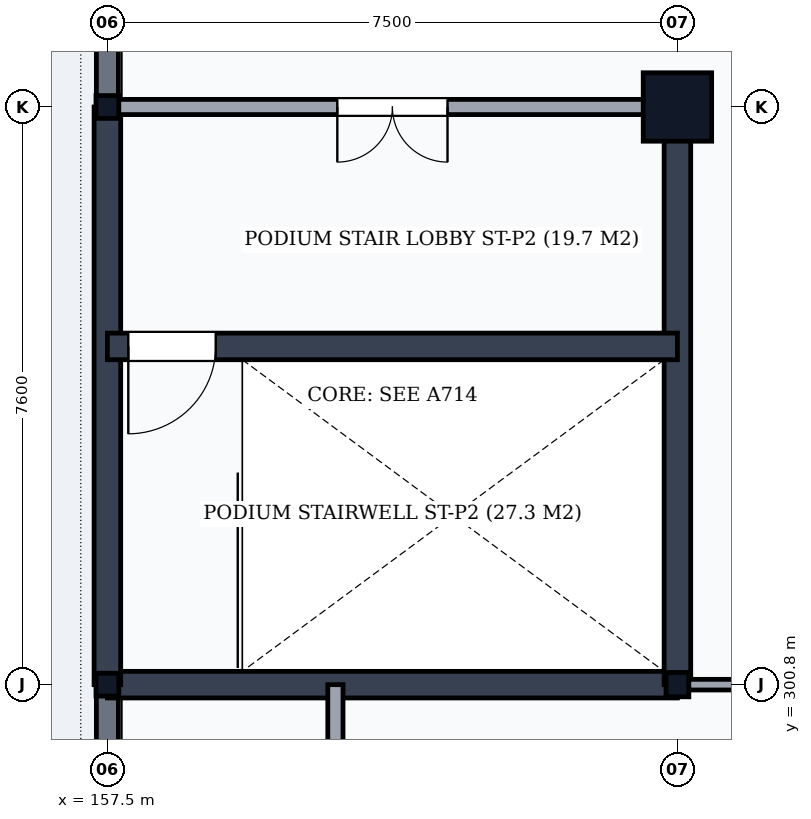
"""IFC4 building model, lengths in metres.
Left out: names, types, materials, properties, quantities, classifications, styles, units other than length and angle.
Written with IfcOpenShell. Run it as: python <this file> out.ifc"""

import sys

from ifc_helpers import new_model, si_unit, direction, frame, frame_2d, origin, origin_2d, place, context, subcontext, project, spatial, rectangle, circle, i_section, extrude, element, fill, save


model = new_model("IFC4")
c1 = context("Model", 3, precision=1e-05, world=origin(), true_north=direction((0.0, 1.0)))
c2 = subcontext(c1, "Body", "Model", "MODEL_VIEW")
j1 = project(units=[si_unit("LENGTHUNIT", "METRE"), si_unit("PLANEANGLEUNIT", "RADIAN")], contexts=[c1])
p1 = place(None, origin())
s1 = spatial("IfcSite", under=j1, at=p1, CompositionType="ELEMENT")
p2 = place(p1, origin())
s2 = spatial("IfcBuilding", under=s1, at=p2, CompositionType="ELEMENT")
p3 = place(p2, frame((0.0, 0.0, 15.6)))
s3 = spatial("IfcBuildingStorey", under=s2, at=p3, CompositionType="ELEMENT", Elevation=15.6)
for number, where, z_axis, x_axis in (
    (1, (157.5, 300.8, 0.0), (0.0, 0.0, 1.0), (1.0, 0.0, 0.0)),
    (2, (157.5, 308.4, 0.0), (0.0, 0.0, 1.0), (1.0, 0.0, 0.0)),
):
    element("IfcColumn", number, at=place(p3, frame(where, z_axis=z_axis, x_axis=x_axis)), inside=s3, PredefinedType="COLUMN", context=c2, shape_type="SweptSolid", body=[
        extrude(i_section(OverallWidth=0.3, OverallDepth=0.3, WebThickness=0.011, FlangeThickness=0.019, FilletRadius=0.027, at=origin_2d()), origin(), (0.0, 0.0, 1.0), 4.8),
    ])
p4 = place(p3, frame((165.0, 300.8, 0.0), z_axis=(0.0, 0.0, 1.0), x_axis=(1.0, 0.0, 0.0)))
e3 = element("IfcColumn", 3, at=p4, inside=s3, PredefinedType="COLUMN", context=c2, shape_type="SweptSolid", body=[
    extrude(i_section(OverallWidth=0.3, OverallDepth=0.32, WebThickness=0.011, FlangeThickness=0.021, FilletRadius=0.027, at=origin_2d()), origin(), (0.0, 0.0, 1.0), 4.8),
])
p5 = place(p3, frame((165.0, 308.4, 0.0), z_axis=(0.0, 0.0, 1.0), x_axis=(1.0, 0.0, 0.0)))
e4 = element("IfcColumn", 4, at=p5, inside=s3, PredefinedType="COLUMN", context=c2, shape_type="SweptSolid", body=[
    extrude(circle(Radius=0.45, at=origin_2d()), origin(), (0.0, 0.0, 1.0), 4.8),
])
p6 = place(p3, frame((157.5, 293.206, 0.0), z_axis=(0.0, 0.0, 1.0), x_axis=(0.0, 1.0, 0.0)))
e5 = element("IfcWall", 5, at=p6, inside=s3, PredefinedType="SOLIDWALL", context=c2, shape_type="SweptSolid", body=[
    extrude(rectangle(XDim=7.588, YDim=0.29, at=frame_2d((3.794, 0.0))), origin(), (0.0, 0.0, 1.0), 4.278),
])
p7 = place(p6, frame((2.694, 0.0, 0.95)))
e6 = element("IfcOpeningElement", 6, at=p7, cuts=e5, PredefinedType="OPENING", context=c2, shape_type="SweptSolid", body=[
    extrude(rectangle(XDim=2.2, YDim=2.8, at=frame_2d((1.1, 1.4))), frame((0.0, 0.16, 0.0), z_axis=(0.0, -1.0, 0.0), x_axis=(1.0, 0.0, 0.0)), (0.0, 0.0, 1.0), 0.32),
])
p8 = place(p3, frame((157.5, 308.406, 0.0), z_axis=(0.0, 0.0, 1.0), x_axis=(0.0, 1.0, 0.0)))
e7 = element("IfcWall", 7, at=p8, inside=s3, PredefinedType="SOLIDWALL", context=c2, shape_type="SweptSolid", body=[
    extrude(rectangle(XDim=7.588, YDim=0.29, at=frame_2d((3.794, 0.0))), origin(), (0.0, 0.0, 1.0), 4.278),
])
p9 = place(p8, frame((2.894, 0.0, 0.95)))
e8 = element("IfcOpeningElement", 8, at=p9, cuts=e7, PredefinedType="OPENING", context=c2, shape_type="SweptSolid", body=[
    extrude(rectangle(XDim=1.8, YDim=2.6, at=frame_2d((0.9, 1.3))), frame((0.0, 0.16, 0.0), z_axis=(0.0, -1.0, 0.0), x_axis=(1.0, 0.0, 0.0)), (0.0, 0.0, 1.0), 0.32),
])
p10 = place(p3, frame((157.6, 248.6, 4.8), z_axis=(0.0, 0.0, 1.0), x_axis=(0.0, 1.0, 0.0)))
e9 = element("IfcWall", 9, at=p10, inside=s3, PredefinedType="PARAPET", context=c2, shape_type="SweptSolid", body=[
    extrude(rectangle(XDim=67.2, YDim=0.18, at=frame_2d((33.6, 0.0))), origin(), (0.0, 0.0, 1.0), 1.2),
])
p11 = place(p3, frame((157.5, 300.8, 0.0), z_axis=(0.0, 0.0, 1.0), x_axis=(1.0, 0.0, 0.0)))
e10 = element("IfcWall", 10, at=p11, inside=s3, PredefinedType="SHEAR", context=c2, shape_type="SweptSolid", body=[
    extrude(rectangle(XDim=7.5, YDim=0.35, at=frame_2d((3.75, 0.0))), origin(), (0.0, 0.0, 1.0), 4.48),
])
for number, where, z_axis, x_axis in (
    (11, (157.5, 300.8, 0.0), (0.0, 0.0, 1.0), (0.0, 1.0, 0.0)),
    (12, (165.0, 300.8, 0.0), (0.0, 0.0, 1.0), (0.0, 1.0, 0.0)),
):
    element("IfcWall", number, at=place(p3, frame(where, z_axis=z_axis, x_axis=x_axis)), inside=s3, PredefinedType="SHEAR", context=c2, shape_type="SweptSolid", body=[
        extrude(rectangle(XDim=7.6, YDim=0.35, at=frame_2d((3.8, 0.0))), origin(), (0.0, 0.0, 1.0), 4.48),
    ])
p12 = place(p3, frame((157.5, 305.25, 0.0), z_axis=(0.0, 0.0, 1.0), x_axis=(1.0, 0.0, 0.0)))
e13 = element("IfcWall", 13, at=p12, inside=s3, PredefinedType="SHEAR", context=c2, shape_type="SweptSolid", body=[
    extrude(rectangle(XDim=7.5, YDim=0.35, at=frame_2d((3.75, 0.0))), origin(), (0.0, 0.0, 1.0), 4.48),
])
p13 = place(p12, frame((0.275, 0.0, 0.0)))
e14 = element("IfcOpeningElement", 14, at=p13, cuts=e13, PredefinedType="OPENING", context=c2, shape_type="SweptSolid", body=[
    extrude(rectangle(XDim=1.15, YDim=2.15, at=frame_2d((0.575, 1.075))), frame((0.0, 0.19, 0.0), z_axis=(0.0, -1.0, 0.0), x_axis=(1.0, 0.0, 0.0)), (0.0, 0.0, 1.0), 0.38),
])
p14 = place(p3, frame((157.5, 308.4, 0.0), z_axis=(0.0, 0.0, 1.0), x_axis=(1.0, 0.0, 0.0)))
e15 = element("IfcWall", 15, at=p14, inside=s3, PredefinedType="PARTITIONING", context=c2, shape_type="SweptSolid", body=[
    extrude(rectangle(XDim=7.5, YDim=0.2, at=frame_2d((3.75, 0.0))), origin(), (0.0, 0.0, 1.0), 3.928),
])
p15 = place(p14, frame((3.025, 0.0, 0.0)))
e16 = element("IfcOpeningElement", 16, at=p15, cuts=e15, PredefinedType="OPENING", context=c2, shape_type="SweptSolid", body=[
    extrude(rectangle(XDim=1.45, YDim=2.2, at=frame_2d((0.725, 1.1))), frame((0.0, 0.115, 0.0), z_axis=(0.0, -1.0, 0.0), x_axis=(1.0, 0.0, 0.0)), (0.0, 0.0, 1.0), 0.23),
])
p16 = place(p3, frame((160.5, 258.2, 0.0), z_axis=(0.0, 0.0, 1.0), x_axis=(0.0, 1.0, 0.0)))
e17 = element("IfcWall", 17, at=p16, inside=s3, PredefinedType="PARTITIONING", context=c2, shape_type="SweptSolid", body=[
    extrude(rectangle(XDim=42.6, YDim=0.2, at=frame_2d((21.3, 0.0))), origin(), (0.0, 0.0, 1.0), 4.55),
])
p17 = place(p16, frame((10.06, 0.0, 0.0)))
e18 = element("IfcOpeningElement", 18, at=p17, cuts=e17, PredefinedType="OPENING", context=c2, shape_type="SweptSolid", body=[
    extrude(rectangle(XDim=1.6, YDim=2.25, at=frame_2d((0.8, 1.125))), frame((0.0, 0.115, 0.0), z_axis=(0.0, -1.0, 0.0), x_axis=(1.0, 0.0, 0.0)), (0.0, 0.0, 1.0), 0.23),
])
p18 = place(p16, frame((31.45, 0.0, 0.0)))
e19 = element("IfcOpeningElement", 19, at=p18, cuts=e17, PredefinedType="OPENING", context=c2, shape_type="SweptSolid", body=[
    extrude(rectangle(XDim=1.1, YDim=2.1, at=frame_2d((0.55, 1.05))), frame((0.0, 0.115, 0.0), z_axis=(0.0, -1.0, 0.0), x_axis=(1.0, 0.0, 0.0)), (0.0, 0.0, 1.0), 0.23),
])
p19 = place(p3, frame((165.0, 300.8, 0.0), z_axis=(0.0, 0.0, 1.0), x_axis=(1.0, 0.0, 0.0)))
e20 = element("IfcWall", 20, at=p19, inside=s3, PredefinedType="PARTITIONING", context=c2, shape_type="SweptSolid", body=[
    extrude(rectangle(XDim=32.0, YDim=0.14, at=frame_2d((16.0, 0.0))), origin(), (0.0, 0.0, 1.0), 3.928),
])
p20 = place(p13, frame((1.15, 0.0, 0.0), z_axis=(0.0, 0.0, 1.0), x_axis=(-1.0, 0.0, 0.0)))
e21 = element("IfcDoor", 21, at=p20, inside=s3, OperationType="SINGLE_SWING_RIGHT", PredefinedType="DOOR", context=c2, shape_type="SweptSolid", body=[
    extrude(rectangle(XDim=1.15, YDim=2.15, at=frame_2d((0.575, 1.075))), frame((0.0, 0.025, 0.0), z_axis=(0.0, -1.0, 0.0), x_axis=(1.0, 0.0, 0.0)), (0.0, 0.0, 1.0), 0.05),
])
fill(e14, e21)
p21 = place(p15, frame((1.45, 0.0, 0.0), z_axis=(0.0, 0.0, 1.0), x_axis=(-1.0, 0.0, 0.0)))
e22 = element("IfcDoor", 22, at=p21, inside=s3, OperationType="DOUBLE_DOOR_SINGLE_SWING", PredefinedType="DOOR", context=c2, shape_type="SweptSolid", body=[
    extrude(rectangle(XDim=1.45, YDim=2.2, at=frame_2d((0.725, 1.1))), frame((0.0, 0.025, 0.0), z_axis=(0.0, -1.0, 0.0), x_axis=(1.0, 0.0, 0.0)), (0.0, 0.0, 1.0), 0.05),
])
fill(e16, e22)
save(model, sys.argv[1])
